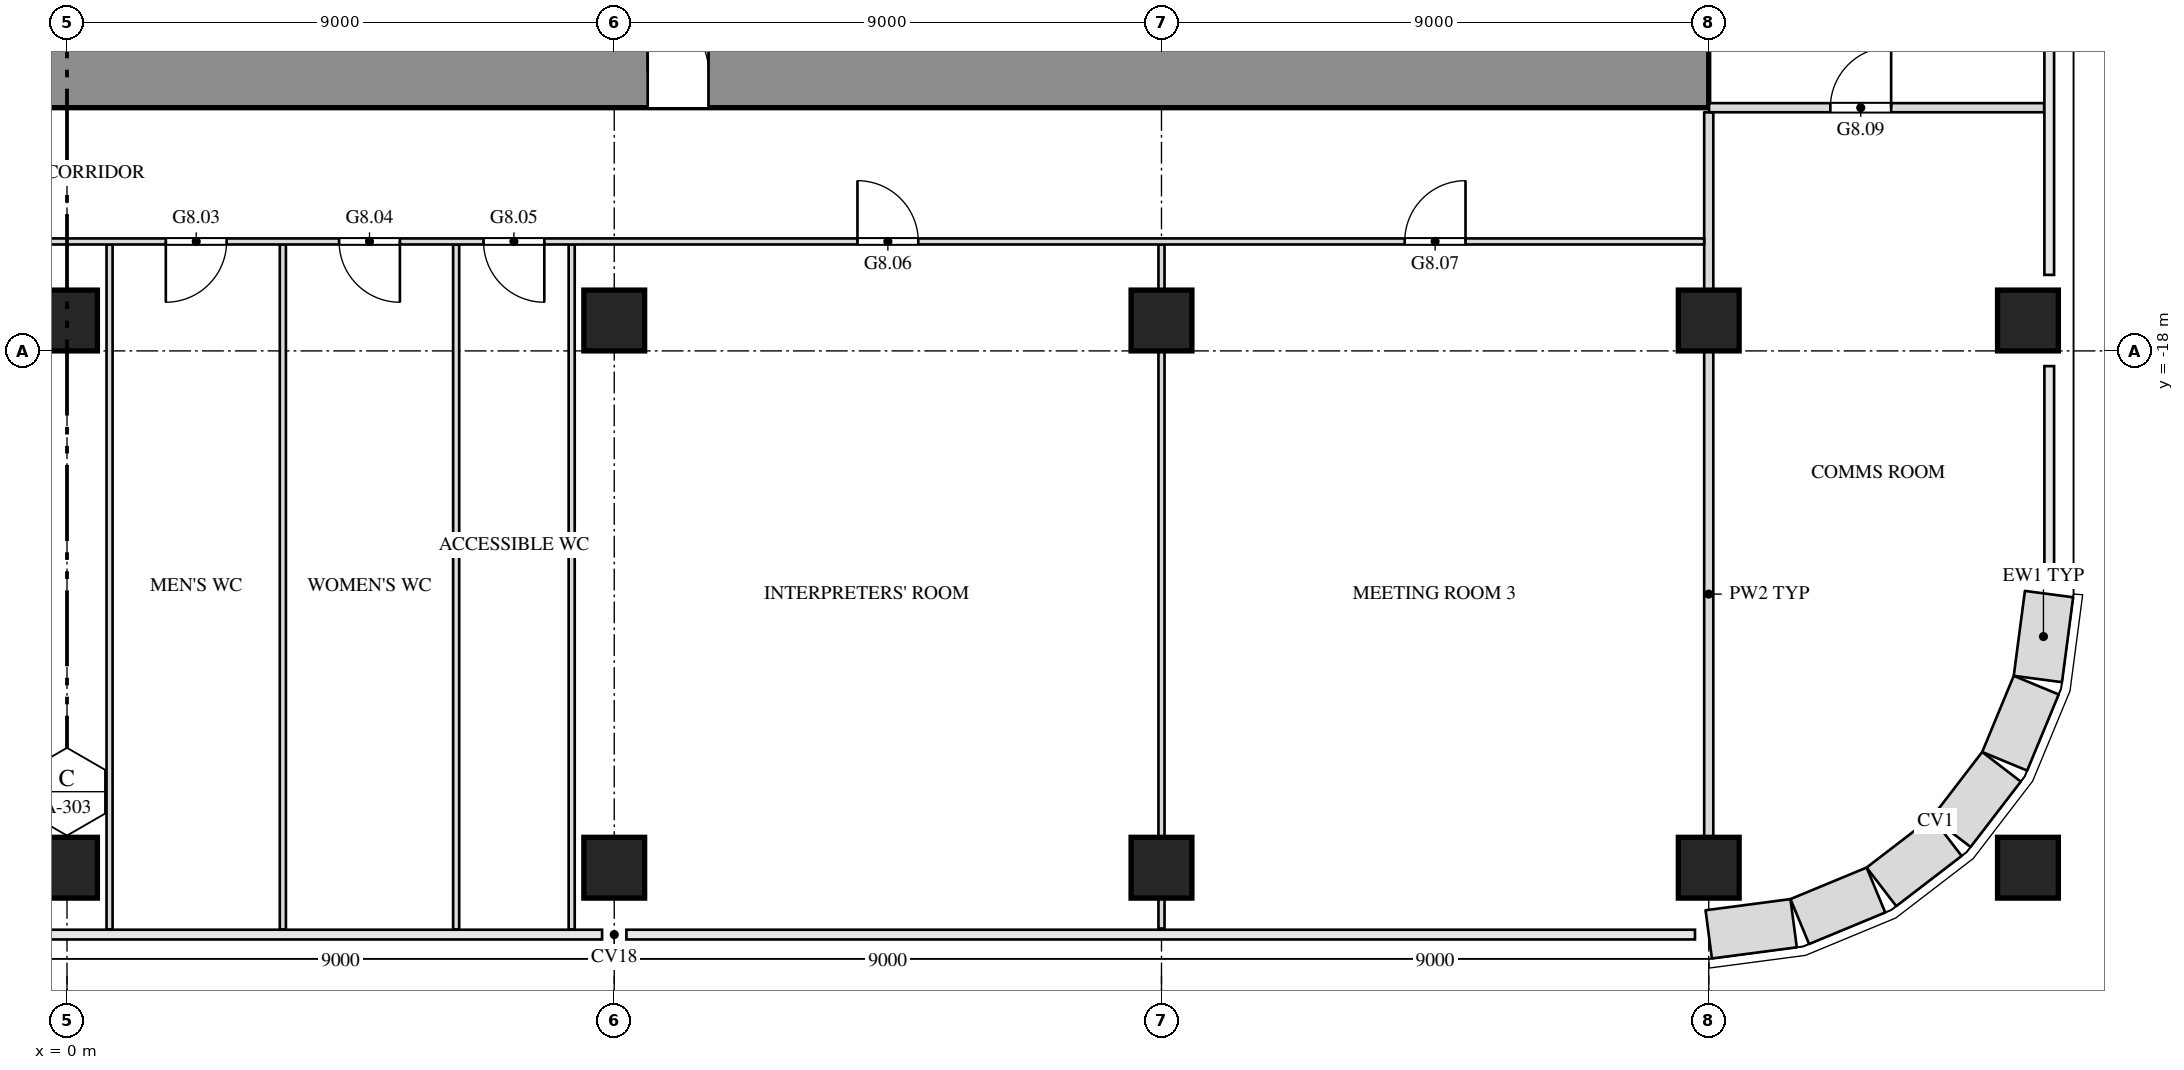
"""IFC4 building model, lengths in metres.
Left out: names, types, materials, properties, quantities, classifications, styles, units other than length and angle.
Written with IfcOpenShell. Run it as: python <this file> out.ifc"""

import sys

from ifc_helpers import new_model, si_unit, direction, frame, frame_2d, origin, origin_2d, place, context, subcontext, project, spatial, rectangle, extrude, element, fill, save


model = new_model("IFC4")
c1 = context("Model", 3, precision=1e-05, world=origin(), true_north=direction((0.0, 1.0)))
c2 = subcontext(c1, "Body", "Model", "MODEL_VIEW")
j1 = project(units=[si_unit("LENGTHUNIT", "METRE"), si_unit("PLANEANGLEUNIT", "RADIAN")], contexts=[c1])
p1 = place(None, origin())
s1 = spatial("IfcSite", under=j1, at=p1, CompositionType="ELEMENT")
p2 = place(p1, origin())
s2 = spatial("IfcBuilding", under=s1, at=p2, CompositionType="ELEMENT")
p3 = place(p2, frame((0.0, 0.0, 48.0)))
s3 = spatial("IfcBuildingStorey", under=s2, at=p3, CompositionType="ELEMENT", Elevation=48.0)
for number, where, z_axis, x_axis in (
    (1, (0.0, -26.5, 0.0), (0.0, 0.0, 1.0), (1.0, 0.0, 0.0)),
    (2, (9.0, -26.5, 0.0), (0.0, 0.0, 1.0), (1.0, 0.0, 0.0)),
    (3, (18.0, -26.5, 0.0), (0.0, 0.0, 1.0), (1.0, 0.0, 0.0)),
    (4, (27.0, -26.5, 0.0), (0.0, 0.0, 1.0), (1.0, 0.0, 0.0)),
    (5, (32.25, -26.5, 0.0), (0.0, 0.0, 1.0), (1.0, 0.0, 0.0)),
    (6, (0.0, -17.5, 0.0), (0.0, 0.0, 1.0), (1.0, 0.0, 0.0)),
    (7, (9.0, -17.5, 0.0), (0.0, 0.0, 1.0), (1.0, 0.0, 0.0)),
    (8, (18.0, -17.5, 0.0), (0.0, 0.0, 1.0), (1.0, 0.0, 0.0)),
    (9, (27.0, -17.5, 0.0), (0.0, 0.0, 1.0), (1.0, 0.0, 0.0)),
    (10, (32.25, -17.5, 0.0), (0.0, 0.0, 1.0), (1.0, 0.0, 0.0)),
):
    element("IfcColumn", number, at=place(p3, frame(where, z_axis=z_axis, x_axis=x_axis)), inside=s3, PredefinedType="COLUMN", context=c2, shape_type="SweptSolid", body=[
        extrude(rectangle(XDim=1.0, YDim=1.0, at=origin_2d()), origin(), (0.0, 0.0, 1.0), 4.5),
    ])
p4 = place(p3, frame((-27.0, -13.4, 0.0), z_axis=(0.0, 0.0, 1.0), x_axis=(1.0, 0.0, 0.0)))
e11 = element("IfcWall", 11, at=p4, inside=s3, PredefinedType="SHEAR", context=c2, shape_type="SweptSolid", body=[
    extrude(rectangle(XDim=54.0, YDim=1.2, at=frame_2d((27.0, 0.0))), origin(), (0.0, 0.0, 1.0), 4.3),
])
p5 = place(p4, frame((16.45, 0.0, 0.0)))
e12 = element("IfcOpeningElement", 12, at=p5, cuts=e11, PredefinedType="OPENING", context=c2, shape_type="SweptSolid", body=[
    extrude(rectangle(XDim=1.0, YDim=2.1, at=frame_2d((0.5, 1.05))), frame((0.0, 0.612, 0.0), z_axis=(0.0, -1.0, 0.0), x_axis=(1.0, 0.0, 0.0)), (0.0, 0.0, 1.0), 1.224),
])
p6 = place(p4, frame((36.55, 0.0, 0.0)))
e13 = element("IfcOpeningElement", 13, at=p6, cuts=e11, PredefinedType="OPENING", context=c2, shape_type="SweptSolid", body=[
    extrude(rectangle(XDim=1.0, YDim=2.1, at=frame_2d((0.5, 1.05))), frame((0.0, 0.612, 0.0), z_axis=(0.0, -1.0, 0.0), x_axis=(1.0, 0.0, 0.0)), (0.0, 0.0, 1.0), 1.224),
])
for number, where, z_axis, x_axis in (
    (14, (0.7, -27.516, 0.0), (0.0, 0.0, 1.0), (0.0, 1.0, 0.0)),
    (15, (3.55, -27.516, 0.0), (0.0, 0.0, 1.0), (0.0, 1.0, 0.0)),
    (16, (6.4, -27.516, 0.0), (0.0, 0.0, 1.0), (0.0, 1.0, 0.0)),
    (17, (8.3, -27.516, 0.0), (0.0, 0.0, 1.0), (0.0, 1.0, 0.0)),
):
    element("IfcWall", number, at=place(p3, frame(where, z_axis=z_axis, x_axis=x_axis)), inside=s3, PredefinedType="PARTITIONING", context=c2, shape_type="SweptSolid", body=[
        extrude(rectangle(XDim=11.266, YDim=0.1, at=frame_2d((5.633, 0.0))), origin(), (0.0, 0.0, 1.0), 4.3),
    ])
p7 = place(p3, frame((18.0, -27.5, 0.0), z_axis=(0.0, 0.0, 1.0), x_axis=(0.0, 1.0, 0.0)))
e18 = element("IfcWall", 18, at=p7, inside=s3, PredefinedType="PARTITIONING", context=c2, shape_type="SweptSolid", body=[
    extrude(rectangle(XDim=0.5, YDim=0.1, at=frame_2d((0.25, 0.0))), origin(), (0.0, 0.0, 1.0), 4.3),
])
p8 = place(p3, frame((18.0, -26.0, 0.0), z_axis=(0.0, 0.0, 1.0), x_axis=(0.0, 1.0, 0.0)))
e19 = element("IfcWall", 19, at=p8, inside=s3, PredefinedType="PARTITIONING", context=c2, shape_type="SweptSolid", body=[
    extrude(rectangle(XDim=8.0, YDim=0.1, at=frame_2d((4.0, 0.0))), origin(), (0.0, 0.0, 1.0), 3.688),
])
p9 = place(p3, frame((18.0, -17.0, 0.0), z_axis=(0.0, 0.0, 1.0), x_axis=(0.0, 1.0, 0.0)))
e20 = element("IfcWall", 20, at=p9, inside=s3, PredefinedType="PARTITIONING", context=c2, shape_type="SweptSolid", body=[
    extrude(rectangle(XDim=0.75, YDim=0.1, at=frame_2d((0.375, 0.0))), origin(), (0.0, 0.0, 1.0), 4.3),
])
p10 = place(p3, frame((27.0, -26.0, 0.0), z_axis=(0.0, 0.0, 1.0), x_axis=(0.0, 1.0, 0.0)))
e21 = element("IfcWall", 21, at=p10, inside=s3, PredefinedType="PARTITIONING", context=c2, shape_type="SweptSolid", body=[
    extrude(rectangle(XDim=8.0, YDim=0.15, at=frame_2d((4.0, 0.0))), origin(), (0.0, 0.0, 1.0), 3.688),
])
p11 = place(p3, frame((27.0, -17.0, 0.0), z_axis=(0.0, 0.0, 1.0), x_axis=(0.0, 1.0, 0.0)))
e22 = element("IfcWall", 22, at=p11, inside=s3, PredefinedType="PARTITIONING", context=c2, shape_type="SweptSolid", body=[
    extrude(rectangle(XDim=2.925, YDim=0.15, at=frame_2d((1.462, 0.0))), origin(), (0.0, 0.0, 1.0), 3.688),
])
p12 = place(p3, frame((-26.9, -16.2, 0.0), z_axis=(0.0, 0.0, 1.0), x_axis=(1.0, 0.0, 0.0)))
e23 = element("IfcWall", 23, at=p12, inside=s3, PredefinedType="PARTITIONING", context=c2, shape_type="SweptSolid", body=[
    extrude(rectangle(XDim=53.825, YDim=0.1, at=frame_2d((26.913, 0.0))), origin(), (0.0, 0.0, 1.0), 4.3),
])
p13 = place(p12, frame((3.9, 0.0, 0.0)))
e24 = element("IfcOpeningElement", 24, at=p13, cuts=e23, PredefinedType="OPENING", context=c2, shape_type="SweptSolid", body=[
    extrude(rectangle(XDim=1.0, YDim=2.1, at=frame_2d((0.5, 1.05))), frame((0.0, 0.062, 0.0), z_axis=(0.0, -1.0, 0.0), x_axis=(1.0, 0.0, 0.0)), (0.0, 0.0, 1.0), 0.124),
])
p14 = place(p12, frame((12.9, 0.0, 0.0)))
e25 = element("IfcOpeningElement", 25, at=p14, cuts=e23, PredefinedType="OPENING", context=c2, shape_type="SweptSolid", body=[
    extrude(rectangle(XDim=1.0, YDim=2.1, at=frame_2d((0.5, 1.05))), frame((0.0, 0.062, 0.0), z_axis=(0.0, -1.0, 0.0), x_axis=(1.0, 0.0, 0.0)), (0.0, 0.0, 1.0), 0.124),
])
p15 = place(p12, frame((28.525, 0.0, 0.0)))
e26 = element("IfcOpeningElement", 26, at=p15, cuts=e23, PredefinedType="OPENING", context=c2, shape_type="SweptSolid", body=[
    extrude(rectangle(XDim=1.0, YDim=2.1, at=frame_2d((0.5, 1.05))), frame((0.0, 0.062, 0.0), z_axis=(0.0, -1.0, 0.0), x_axis=(1.0, 0.0, 0.0)), (0.0, 0.0, 1.0), 0.124),
])
p16 = place(p12, frame((31.375, 0.0, 0.0)))
e27 = element("IfcOpeningElement", 27, at=p16, cuts=e23, PredefinedType="OPENING", context=c2, shape_type="SweptSolid", body=[
    extrude(rectangle(XDim=1.0, YDim=2.1, at=frame_2d((0.5, 1.05))), frame((0.0, 0.062, 0.0), z_axis=(0.0, -1.0, 0.0), x_axis=(1.0, 0.0, 0.0)), (0.0, 0.0, 1.0), 0.124),
])
p17 = place(p12, frame((33.75, 0.0, 0.0)))
e28 = element("IfcOpeningElement", 28, at=p17, cuts=e23, PredefinedType="OPENING", context=c2, shape_type="SweptSolid", body=[
    extrude(rectangle(XDim=1.0, YDim=2.1, at=frame_2d((0.5, 1.05))), frame((0.0, 0.062, 0.0), z_axis=(0.0, -1.0, 0.0), x_axis=(1.0, 0.0, 0.0)), (0.0, 0.0, 1.0), 0.124),
])
p18 = place(p12, frame((39.9, 0.0, 0.0)))
e29 = element("IfcOpeningElement", 29, at=p18, cuts=e23, PredefinedType="OPENING", context=c2, shape_type="SweptSolid", body=[
    extrude(rectangle(XDim=1.0, YDim=2.1, at=frame_2d((0.5, 1.05))), frame((0.0, 0.062, 0.0), z_axis=(0.0, -1.0, 0.0), x_axis=(1.0, 0.0, 0.0)), (0.0, 0.0, 1.0), 0.124),
])
p19 = place(p12, frame((48.9, 0.0, 0.0)))
e30 = element("IfcOpeningElement", 30, at=p19, cuts=e23, PredefinedType="OPENING", context=c2, shape_type="SweptSolid", body=[
    extrude(rectangle(XDim=1.0, YDim=2.1, at=frame_2d((0.5, 1.05))), frame((0.0, 0.062, 0.0), z_axis=(0.0, -1.0, 0.0), x_axis=(1.0, 0.0, 0.0)), (0.0, 0.0, 1.0), 0.124),
])
p20 = place(p3, frame((27.005, -14.0, 0.0), z_axis=(0.0, 0.0, 1.0), x_axis=(1.0, 0.0, 0.0)))
e31 = element("IfcWall", 31, at=p20, inside=s3, PredefinedType="PARTITIONING", context=c2, shape_type="SweptSolid", body=[
    extrude(rectangle(XDim=5.511, YDim=0.15, at=frame_2d((2.756, 0.0))), origin(), (0.0, 0.0, 1.0), 4.3),
])
p21 = place(p20, frame((1.995, 0.0, 0.0)))
e32 = element("IfcOpeningElement", 32, at=p21, cuts=e31, PredefinedType="OPENING", context=c2, shape_type="SweptSolid", body=[
    extrude(rectangle(XDim=1.0, YDim=2.1, at=frame_2d((0.5, 1.05))), frame((0.0, 0.087, 0.0), z_axis=(0.0, -1.0, 0.0), x_axis=(1.0, 0.0, 0.0)), (0.0, 0.0, 1.0), 0.174),
])
p22 = place(p3, frame((27.0, -27.597, 0.0), z_axis=(0.0, 0.0, 1.0), x_axis=(0.99144603414, 0.130517283865, 0.0)))
e33 = element("IfcWall", 33, at=p22, inside=s3, PredefinedType="SOLIDWALL", context=c2, shape_type="SweptSolid", body=[
    extrude(rectangle(XDim=1.408, YDim=0.8, at=frame_2d((0.704, 0.0))), origin(), (0.0, 0.0, 1.0), 4.3),
])
p23 = place(p3, frame((28.497, -27.386, 0.0), z_axis=(0.0, 0.0, 1.0), x_axis=(0.923847774587, 0.38276009378, 0.0)))
e34 = element("IfcWall", 34, at=p23, inside=s3, PredefinedType="SOLIDWALL", context=c2, shape_type="SweptSolid", body=[
    extrude(rectangle(XDim=1.355, YDim=0.8, at=frame_2d((0.678, 0.0))), origin(), (0.0, 0.0, 1.0), 4.3),
])
for number, where, z_axis, x_axis in (
    (35, (29.84, -26.815, 0.0), (0.0, 0.0, 1.0), (0.793, 0.609, 0.0)),
    (36, (30.989, -25.916, 0.0), (0.0, 0.0, 1.0), (0.609, 0.793, 0.0)),
):
    element("IfcWall", number, at=place(p3, frame(where, z_axis=z_axis, x_axis=x_axis)), inside=s3, PredefinedType="SOLIDWALL", context=c2, shape_type="SweptSolid", body=[
        extrude(rectangle(XDim=1.356, YDim=0.8, at=frame_2d((0.678, 0.0))), origin(), (0.0, 0.0, 1.0), 4.3),
    ])
p24 = place(p3, frame((31.867, -24.75, 0.0), z_axis=(0.0, 0.0, 1.0), x_axis=(0.38276009378, 0.923847774587, 0.0)))
e37 = element("IfcWall", 37, at=p24, inside=s3, PredefinedType="SOLIDWALL", context=c2, shape_type="SweptSolid", body=[
    extrude(rectangle(XDim=1.355, YDim=0.8, at=frame_2d((0.678, 0.0))), origin(), (0.0, 0.0, 1.0), 4.3),
])
p25 = place(p3, frame((32.413, -23.396, 0.0), z_axis=(0.0, 0.0, 1.0), x_axis=(0.130517283865, 0.99144603414, 0.0)))
e38 = element("IfcWall", 38, at=p25, inside=s3, PredefinedType="SOLIDWALL", context=c2, shape_type="SweptSolid", body=[
    extrude(rectangle(XDim=1.408, YDim=0.8, at=frame_2d((0.704, 0.0))), origin(), (0.0, 0.0, 1.0), 4.3),
])
p26 = place(p15, origin())
e39 = element("IfcDoor", 39, at=p26, inside=s3, OperationType="SINGLE_SWING_RIGHT", PredefinedType="DOOR", context=c2, shape_type="SweptSolid", body=[
    extrude(rectangle(XDim=1.0, YDim=2.1, at=frame_2d((0.5, 1.05))), frame((0.0, 0.025, 0.0), z_axis=(0.0, -1.0, 0.0), x_axis=(1.0, 0.0, 0.0)), (0.0, 0.0, 1.0), 0.05),
])
fill(e26, e39)
p27 = place(p16, origin())
e40 = element("IfcDoor", 40, at=p27, inside=s3, OperationType="SINGLE_SWING_LEFT", PredefinedType="DOOR", context=c2, shape_type="SweptSolid", body=[
    extrude(rectangle(XDim=1.0, YDim=2.1, at=frame_2d((0.5, 1.05))), frame((0.0, 0.025, 0.0), z_axis=(0.0, -1.0, 0.0), x_axis=(1.0, 0.0, 0.0)), (0.0, 0.0, 1.0), 0.05),
])
fill(e27, e40)
p28 = place(p17, origin())
e41 = element("IfcDoor", 41, at=p28, inside=s3, OperationType="SINGLE_SWING_LEFT", PredefinedType="DOOR", context=c2, shape_type="SweptSolid", body=[
    extrude(rectangle(XDim=1.0, YDim=2.1, at=frame_2d((0.5, 1.05))), frame((0.0, 0.025, 0.0), z_axis=(0.0, -1.0, 0.0), x_axis=(1.0, 0.0, 0.0)), (0.0, 0.0, 1.0), 0.05),
])
fill(e28, e41)
p29 = place(p18, origin())
e42 = element("IfcDoor", 42, at=p29, inside=s3, OperationType="SINGLE_SWING_LEFT", PredefinedType="DOOR", context=c2, shape_type="SweptSolid", body=[
    extrude(rectangle(XDim=1.0, YDim=2.1, at=frame_2d((0.5, 1.05))), frame((0.0, 0.025, 0.0), z_axis=(0.0, -1.0, 0.0), x_axis=(1.0, 0.0, 0.0)), (0.0, 0.0, 1.0), 0.05),
])
fill(e29, e42)
p30 = place(p19, origin())
e43 = element("IfcDoor", 43, at=p30, inside=s3, OperationType="SINGLE_SWING_RIGHT", PredefinedType="DOOR", context=c2, shape_type="SweptSolid", body=[
    extrude(rectangle(XDim=1.0, YDim=2.1, at=frame_2d((0.5, 1.05))), frame((0.0, 0.025, 0.0), z_axis=(0.0, -1.0, 0.0), x_axis=(1.0, 0.0, 0.0)), (0.0, 0.0, 1.0), 0.05),
])
fill(e30, e43)
p31 = place(p21, origin())
e44 = element("IfcDoor", 44, at=p31, inside=s3, OperationType="SINGLE_SWING_RIGHT", PredefinedType="DOOR", context=c2, shape_type="SweptSolid", body=[
    extrude(rectangle(XDim=1.0, YDim=2.1, at=frame_2d((0.5, 1.05))), frame((0.0, 0.025, 0.0), z_axis=(0.0, -1.0, 0.0), x_axis=(1.0, 0.0, 0.0)), (0.0, 0.0, 1.0), 0.05),
])
fill(e32, e44)
p32 = place(p6, origin())
e45 = element("IfcDoor", 45, at=p32, inside=s3, OperationType="SINGLE_SWING_LEFT", PredefinedType="DOOR", context=c2, shape_type="SweptSolid", body=[
    extrude(rectangle(XDim=1.0, YDim=2.1, at=frame_2d((0.5, 1.05))), frame((0.0, 0.025, 0.0), z_axis=(0.0, -1.0, 0.0), x_axis=(1.0, 0.0, 0.0)), (0.0, 0.0, 1.0), 0.05),
])
fill(e13, e45)
save(model, sys.argv[1])
